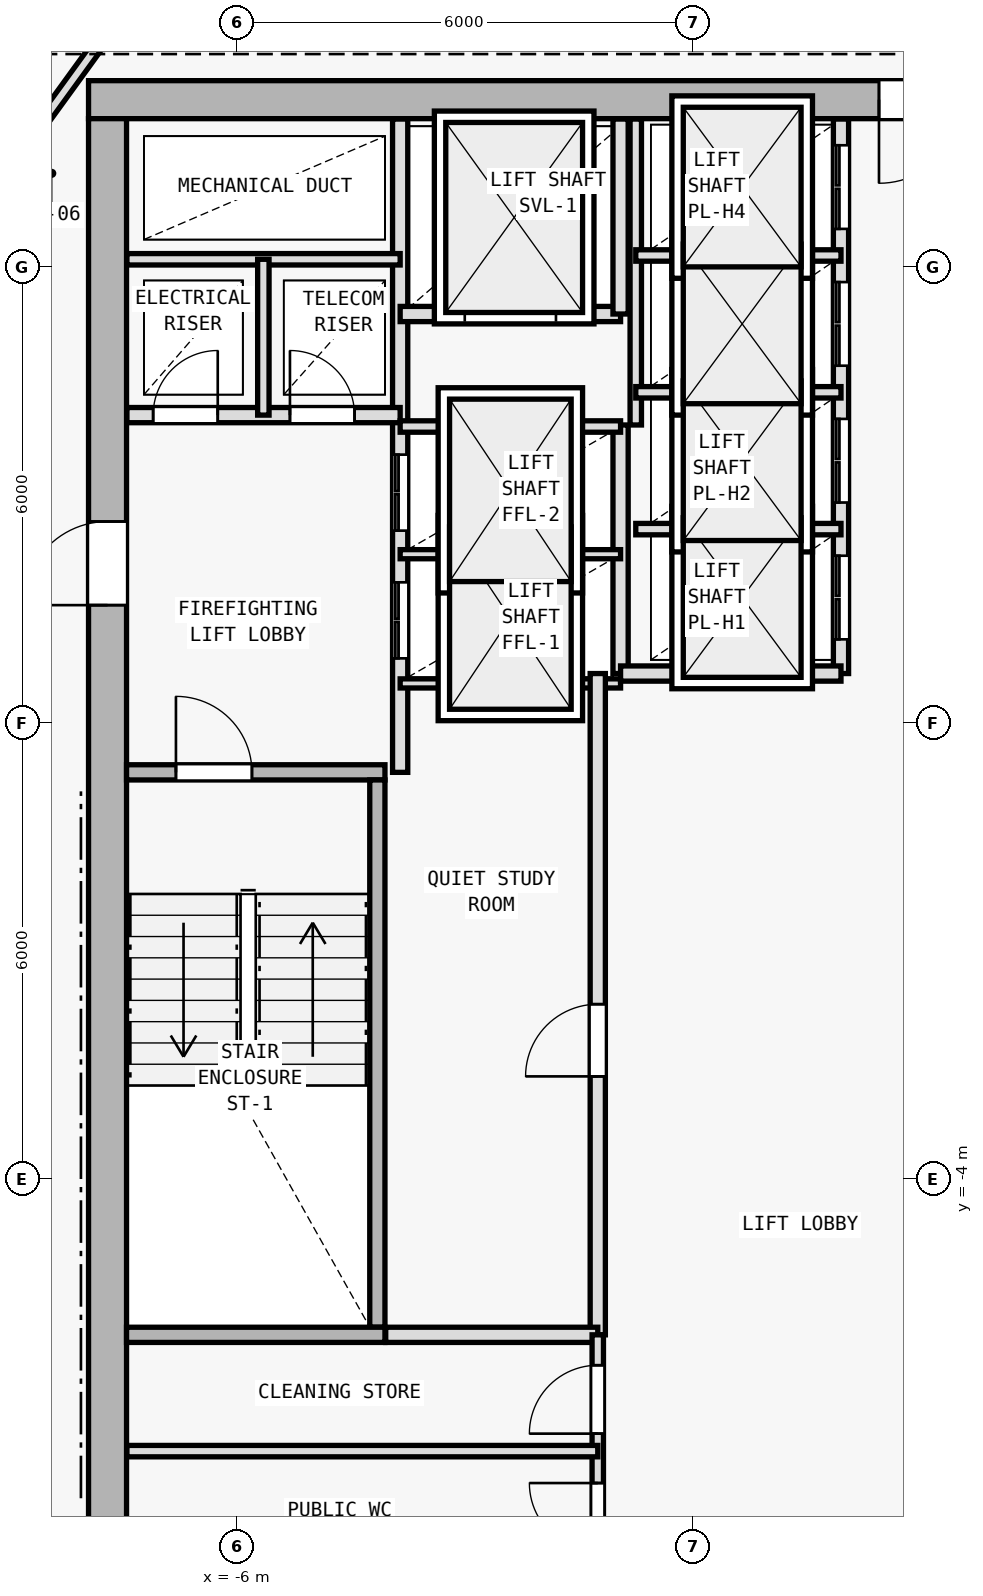
"""IFC4 building model, lengths in metres.
Left out: names, types, materials, properties, quantities, classifications, styles, units other than length and angle.
Written with IfcOpenShell. Run it as: python <this file> out.ifc"""

import sys

from ifc_helpers import new_model, si_unit, direction, frame, frame_2d, origin, origin_2d, place, context, subcontext, project, spatial, rectangle, i_section, extrude, element, fill, save


model = new_model("IFC4")
c1 = context("Model", 3, precision=1e-05, world=origin(), true_north=direction((0.0, 1.0)))
c2 = subcontext(c1, "Body", "Model", "MODEL_VIEW")
j1 = project(units=[si_unit("LENGTHUNIT", "METRE"), si_unit("PLANEANGLEUNIT", "RADIAN")], contexts=[c1])
p1 = place(None, origin())
s1 = spatial("IfcSite", under=j1, at=p1, CompositionType="ELEMENT")
p2 = place(p1, origin())
s2 = spatial("IfcBuilding", under=s1, at=p2, CompositionType="ELEMENT")
p3 = place(p2, frame((0.0, 0.0, 254.4)))
s3 = spatial("IfcBuildingStorey", under=s2, at=p3, CompositionType="ELEMENT", Elevation=254.4)
for number, where, z_axis, x_axis in (
    (1, (-7.7, 10.2, 0.0), (0.0, 0.0, 1.0), (1.0, 0.0, 0.0)),
    (2, (-7.7, 2.0, 0.0), (0.0, 0.0, 1.0), (1.0, 0.0, 0.0)),
):
    element("IfcColumn", number, at=place(p3, frame(where, z_axis=z_axis, x_axis=x_axis)), inside=s3, PredefinedType="COLUMN", context=c2, shape_type="SweptSolid", body=[
        extrude(i_section(OverallWidth=0.374, OverallDepth=0.372, WebThickness=0.012, FlangeThickness=0.02, FilletRadius=0.015, at=origin_2d()), origin(), (0.0, 0.0, 1.0), 3.6),
    ])
p4 = place(p3, frame((7.95, 10.2, 0.0), z_axis=(0.0, 0.0, 1.0), x_axis=(-1.0, 0.0, 0.0)))
e3 = element("IfcWall", 3, at=p4, inside=s3, PredefinedType="SHEAR", context=c2, shape_type="SweptSolid", body=[
    extrude(rectangle(XDim=15.9, YDim=0.5, at=frame_2d((7.95, 0.0))), origin(), (0.0, 0.0, 1.0), 3.35),
])
p5 = place(p4, frame((4.4, 0.0, 0.0)))
e4 = element("IfcOpeningElement", 4, at=p5, cuts=e3, PredefinedType="OPENING", context=c2, shape_type="SweptSolid", body=[
    extrude(rectangle(XDim=1.1, YDim=2.15, at=frame_2d((0.55, 1.075))), frame((0.0, 0.26, 0.0), z_axis=(0.0, -1.0, 0.0), x_axis=(1.0, 0.0, 0.0)), (0.0, 0.0, 1.0), 0.52),
])
p6 = place(p3, frame((-7.7, -9.15, 0.0), z_axis=(0.0, 0.0, 1.0), x_axis=(0.0, 1.0, 0.0)))
e5 = element("IfcWall", 5, at=p6, inside=s3, PredefinedType="SHEAR", context=c2, shape_type="SweptSolid", body=[
    extrude(rectangle(XDim=19.1, YDim=0.5, at=frame_2d((9.55, 0.0))), origin(), (0.0, 0.0, 1.0), 3.35),
])
p7 = place(p6, frame((12.7, 0.0, 0.0)))
e6 = element("IfcOpeningElement", 6, at=p7, cuts=e5, PredefinedType="OPENING", context=c2, shape_type="SweptSolid", body=[
    extrude(rectangle(XDim=1.1, YDim=2.15, at=frame_2d((0.55, 1.075))), frame((0.0, 0.26, 0.0), z_axis=(0.0, -1.0, 0.0), x_axis=(1.0, 0.0, 0.0)), (0.0, 0.0, 1.0), 0.52),
])
p8 = place(p3, frame((-7.45, 1.35, 0.0), z_axis=(0.0, 0.0, 1.0), x_axis=(1.0, 0.0, 0.0)))
e7 = element("IfcWall", 7, at=p8, inside=s3, PredefinedType="SOLIDWALL", context=c2, shape_type="SweptSolid", body=[
    extrude(rectangle(XDim=3.4, YDim=0.2, at=frame_2d((1.7, 0.0))), origin(), (0.0, 0.0, 1.0), 3.35),
])
p9 = place(p8, frame((0.65, 0.0, 0.0)))
e8 = element("IfcOpeningElement", 8, at=p9, cuts=e7, PredefinedType="OPENING", context=c2, shape_type="SweptSolid", body=[
    extrude(rectangle(XDim=1.0, YDim=2.15, at=frame_2d((0.5, 1.075))), frame((0.0, 0.11, 0.0), z_axis=(0.0, -1.0, 0.0), x_axis=(1.0, 0.0, 0.0)), (0.0, 0.0, 1.0), 0.22),
])
p10 = place(p3, frame((-4.15, -5.95, 0.0), z_axis=(0.0, 0.0, 1.0), x_axis=(0.0, 1.0, 0.0)))
e9 = element("IfcWall", 9, at=p10, inside=s3, PredefinedType="SOLIDWALL", context=c2, shape_type="SweptSolid", body=[
    extrude(rectangle(XDim=7.2, YDim=0.2, at=frame_2d((3.6, 0.0))), origin(), (0.0, 0.0, 1.0), 3.35),
])
p11 = place(p3, frame((-3.85, 1.35, 0.0), z_axis=(0.0, 0.0, 1.0), x_axis=(0.0, 1.0, 0.0)))
e10 = element("IfcWall", 10, at=p11, inside=s3, PredefinedType="SOLIDWALL", context=c2, shape_type="SweptSolid", body=[
    extrude(rectangle(XDim=8.595, YDim=0.2, at=frame_2d((4.297, 0.0))), origin(), (0.0, 0.0, 1.0), 3.35),
])
p12 = place(p11, frame((1.5, 0.0, 0.0)))
e11 = element("IfcOpeningElement", 11, at=p12, cuts=e10, PredefinedType="OPENING", context=c2, shape_type="SweptSolid", body=[
    extrude(rectangle(XDim=1.0, YDim=2.15, at=frame_2d((0.5, 1.075))), frame((0.0, 0.11, 0.0), z_axis=(0.0, -1.0, 0.0), x_axis=(1.0, 0.0, 0.0)), (0.0, 0.0, 1.0), 0.22),
])
p13 = place(p11, frame((3.18, 0.0, 0.0)))
e12 = element("IfcOpeningElement", 12, at=p13, cuts=e10, PredefinedType="OPENING", context=c2, shape_type="SweptSolid", body=[
    extrude(rectangle(XDim=1.0, YDim=2.15, at=frame_2d((0.5, 1.075))), frame((0.0, 0.11, 0.0), z_axis=(0.0, -1.0, 0.0), x_axis=(1.0, 0.0, 0.0)), (0.0, 0.0, 1.0), 0.22),
])
p14 = place(p3, frame((-7.445, 6.05, 0.0), z_axis=(0.0, 0.0, 1.0), x_axis=(1.0, 0.0, 0.0)))
e13 = element("IfcWall", 13, at=p14, inside=s3, PredefinedType="SOLIDWALL", context=c2, shape_type="SweptSolid", body=[
    extrude(rectangle(XDim=3.595, YDim=0.2, at=frame_2d((1.797, 0.0))), origin(), (0.0, 0.0, 1.0), 3.35),
])
p15 = place(p14, frame((0.345, 0.0, 0.0)))
e14 = element("IfcOpeningElement", 14, at=p15, cuts=e13, PredefinedType="OPENING", context=c2, shape_type="SweptSolid", body=[
    extrude(rectangle(XDim=0.85, YDim=2.1, at=frame_2d((0.425, 1.05))), frame((0.0, 0.11, 0.0), z_axis=(0.0, -1.0, 0.0), x_axis=(1.0, 0.0, 0.0)), (0.0, 0.0, 1.0), 0.22),
])
p16 = place(p14, frame((2.145, 0.0, 0.0)))
e15 = element("IfcOpeningElement", 15, at=p16, cuts=e13, PredefinedType="OPENING", context=c2, shape_type="SweptSolid", body=[
    extrude(rectangle(XDim=0.85, YDim=2.1, at=frame_2d((0.425, 1.05))), frame((0.0, 0.11, 0.0), z_axis=(0.0, -1.0, 0.0), x_axis=(1.0, 0.0, 0.0)), (0.0, 0.0, 1.0), 0.22),
])
p17 = place(p3, frame((-7.445, 8.1, 0.0), z_axis=(0.0, 0.0, 1.0), x_axis=(1.0, 0.0, 0.0)))
e16 = element("IfcWall", 16, at=p17, inside=s3, PredefinedType="PARTITIONING", context=c2, shape_type="SweptSolid", body=[
    extrude(rectangle(XDim=3.595, YDim=0.15, at=frame_2d((1.797, 0.0))), origin(), (0.0, 0.0, 1.0), 3.35),
])
p18 = place(p3, frame((-5.65, 6.05, 0.0), z_axis=(0.0, 0.0, 1.0), x_axis=(0.0, 1.0, 0.0)))
e17 = element("IfcWall", 17, at=p18, inside=s3, PredefinedType="PARTITIONING", context=c2, shape_type="SweptSolid", body=[
    extrude(rectangle(XDim=2.05, YDim=0.15, at=frame_2d((1.025, 0.0))), origin(), (0.0, 0.0, 1.0), 3.35),
])
p19 = place(p3, frame((-0.95, 2.65, 0.0), z_axis=(0.0, 0.0, 1.0), x_axis=(0.0, 1.0, 0.0)))
e18 = element("IfcWall", 18, at=p19, inside=s3, PredefinedType="SOLIDWALL", context=c2, shape_type="SweptSolid", body=[
    extrude(rectangle(XDim=3.27, YDim=0.2, at=frame_2d((1.635, 0.0))), origin(), (0.0, 0.0, 1.0), 3.35),
])
for number, where, z_axis, x_axis in (
    (19, (-3.85, 2.52, 0.0), (0.0, 0.0, 1.0), (1.0, 0.0, 0.0)),
    (20, (-3.85, 4.22, 0.0), (0.0, 0.0, 1.0), (1.0, 0.0, 0.0)),
):
    element("IfcWall", number, at=place(p3, frame(where, z_axis=z_axis, x_axis=x_axis)), inside=s3, PredefinedType="PARTITIONING", context=c2, shape_type="SweptSolid", body=[
        extrude(rectangle(XDim=2.9, YDim=0.12, at=frame_2d((1.45, 0.0))), origin(), (0.0, 0.0, 1.0), 3.35),
    ])
p20 = place(p3, frame((-3.85, 5.9, 0.0), z_axis=(0.0, 0.0, 1.0), x_axis=(1.0, 0.0, 0.0)))
e21 = element("IfcWall", 21, at=p20, inside=s3, PredefinedType="PARTITIONING", context=c2, shape_type="SweptSolid", body=[
    extrude(rectangle(XDim=2.9, YDim=0.15, at=frame_2d((1.45, 0.0))), origin(), (0.0, 0.0, 1.0), 3.35),
])
p21 = place(p3, frame((-3.85, 7.38, 0.0), z_axis=(0.0, 0.0, 1.0), x_axis=(1.0, 0.0, 0.0)))
e22 = element("IfcWall", 22, at=p21, inside=s3, PredefinedType="SOLIDWALL", context=c2, shape_type="SweptSolid", body=[
    extrude(rectangle(XDim=2.9, YDim=0.2, at=frame_2d((1.45, 0.0))), origin(), (0.0, 0.0, 1.0), 3.35),
])
p22 = place(p21, frame((0.85, 0.0, 0.0)))
e23 = element("IfcOpeningElement", 23, at=p22, cuts=e22, PredefinedType="OPENING", context=c2, shape_type="SweptSolid", body=[
    extrude(rectangle(XDim=1.2, YDim=2.2, at=frame_2d((0.6, 1.1))), frame((0.0, 0.11, 0.0), z_axis=(0.0, -1.0, 0.0), x_axis=(1.0, 0.0, 0.0)), (0.0, 0.0, 1.0), 0.22),
])
p23 = place(p3, frame((-0.95, 7.38, 0.0), z_axis=(0.0, 0.0, 1.0), x_axis=(0.0, 1.0, 0.0)))
e24 = element("IfcWall", 24, at=p23, inside=s3, PredefinedType="SOLIDWALL", context=c2, shape_type="SweptSolid", body=[
    extrude(rectangle(XDim=2.565, YDim=0.2, at=frame_2d((1.283, 0.0))), origin(), (0.0, 0.0, 1.0), 3.35),
])
p24 = place(p3, frame((-1.25, -6.05, 0.0), z_axis=(0.0, 0.0, 1.0), x_axis=(0.0, 1.0, 0.0)))
e25 = element("IfcWall", 25, at=p24, inside=s3, PredefinedType="SOLIDWALL", context=c2, shape_type="SweptSolid", body=[
    extrude(rectangle(XDim=8.7, YDim=0.2, at=frame_2d((4.35, 0.0))), origin(), (0.0, 0.0, 1.0), 3.35),
])
p25 = place(p24, frame((3.4, 0.0, 0.0)))
e26 = element("IfcOpeningElement", 26, at=p25, cuts=e25, PredefinedType="OPENING", context=c2, shape_type="SweptSolid", body=[
    extrude(rectangle(XDim=0.95, YDim=2.1, at=frame_2d((0.475, 1.05))), frame((0.0, 0.11, 0.0), z_axis=(0.0, -1.0, 0.0), x_axis=(1.0, 0.0, 0.0)), (0.0, 0.0, 1.0), 0.22),
])
p26 = place(p3, frame((1.95, 2.65, 0.0), z_axis=(0.0, 0.0, 1.0), x_axis=(0.0, 1.0, 0.0)))
e27 = element("IfcWall", 27, at=p26, inside=s3, PredefinedType="SOLIDWALL", context=c2, shape_type="SweptSolid", body=[
    extrude(rectangle(XDim=7.295, YDim=0.2, at=frame_2d((3.647, 0.0))), origin(), (0.0, 0.0, 1.0), 3.35),
])
p27 = place(p26, frame((0.45, 0.0, 0.0)))
e28 = element("IfcOpeningElement", 28, at=p27, cuts=e27, PredefinedType="OPENING", context=c2, shape_type="SweptSolid", body=[
    extrude(rectangle(XDim=1.1, YDim=2.15, at=frame_2d((0.55, 1.075))), frame((0.0, 0.11, 0.0), z_axis=(0.0, -1.0, 0.0), x_axis=(1.0, 0.0, 0.0)), (0.0, 0.0, 1.0), 0.22),
])
p28 = place(p26, frame((2.25, 0.0, 0.0)))
e29 = element("IfcOpeningElement", 29, at=p28, cuts=e27, PredefinedType="OPENING", context=c2, shape_type="SweptSolid", body=[
    extrude(rectangle(XDim=1.1, YDim=2.15, at=frame_2d((0.55, 1.075))), frame((0.0, 0.11, 0.0), z_axis=(0.0, -1.0, 0.0), x_axis=(1.0, 0.0, 0.0)), (0.0, 0.0, 1.0), 0.22),
])
p29 = place(p26, frame((4.05, 0.0, 0.0)))
e30 = element("IfcOpeningElement", 30, at=p29, cuts=e27, PredefinedType="OPENING", context=c2, shape_type="SweptSolid", body=[
    extrude(rectangle(XDim=1.1, YDim=2.15, at=frame_2d((0.55, 1.075))), frame((0.0, 0.11, 0.0), z_axis=(0.0, -1.0, 0.0), x_axis=(1.0, 0.0, 0.0)), (0.0, 0.0, 1.0), 0.22),
])
p30 = place(p26, frame((5.85, 0.0, 0.0)))
e31 = element("IfcOpeningElement", 31, at=p30, cuts=e27, PredefinedType="OPENING", context=c2, shape_type="SweptSolid", body=[
    extrude(rectangle(XDim=1.1, YDim=2.15, at=frame_2d((0.55, 1.075))), frame((0.0, 0.11, 0.0), z_axis=(0.0, -1.0, 0.0), x_axis=(1.0, 0.0, 0.0)), (0.0, 0.0, 1.0), 0.22),
])
p31 = place(p3, frame((-0.95, 2.65, 0.0), z_axis=(0.0, 0.0, 1.0), x_axis=(1.0, 0.0, 0.0)))
e32 = element("IfcWall", 32, at=p31, inside=s3, PredefinedType="SOLIDWALL", context=c2, shape_type="SweptSolid", body=[
    extrude(rectangle(XDim=2.9, YDim=0.2, at=frame_2d((1.45, 0.0))), origin(), (0.0, 0.0, 1.0), 3.35),
])
p32 = place(p3, frame((-0.75, 5.92, 0.0), z_axis=(0.0, 0.0, 1.0), x_axis=(0.0, 1.0, 0.0)))
e33 = element("IfcWall", 33, at=p32, inside=s3, PredefinedType="PARTITIONING", context=c2, shape_type="SweptSolid", body=[
    extrude(rectangle(XDim=4.025, YDim=0.15, at=frame_2d((2.013, 0.0))), origin(), (0.0, 0.0, 1.0), 3.35),
])
for number, where, z_axis, x_axis in (
    (34, (-0.75, 4.55, 0.0), (0.0, 0.0, 1.0), (1.0, 0.0, 0.0)),
    (35, (-0.75, 6.35, 0.0), (0.0, 0.0, 1.0), (1.0, 0.0, 0.0)),
    (36, (-0.75, 8.15, 0.0), (0.0, 0.0, 1.0), (1.0, 0.0, 0.0)),
):
    element("IfcWall", number, at=place(p3, frame(where, z_axis=z_axis, x_axis=x_axis)), inside=s3, PredefinedType="PARTITIONING", context=c2, shape_type="SweptSolid", body=[
        extrude(rectangle(XDim=2.7, YDim=0.15, at=frame_2d((1.35, 0.0))), origin(), (0.0, 0.0, 1.0), 3.35),
    ])
p33 = place(p3, frame((-7.45, -6.05, 0.0), z_axis=(0.0, 0.0, 1.0), x_axis=(1.0, 0.0, 0.0)))
e37 = element("IfcWall", 37, at=p33, inside=s3, PredefinedType="SOLIDWALL", context=c2, shape_type="SweptSolid", body=[
    extrude(rectangle(XDim=3.4, YDim=0.2, at=frame_2d((1.7, 0.0))), origin(), (0.0, 0.0, 1.0), 3.35),
])
p34 = place(p3, frame((-4.04, -6.05, 0.0), z_axis=(0.0, 0.0, 1.0), x_axis=(1.0, 0.0, 0.0)))
e38 = element("IfcWall", 38, at=p34, inside=s3, PredefinedType="SOLIDWALL", context=c2, shape_type="SweptSolid", body=[
    extrude(rectangle(XDim=2.79, YDim=0.2, at=frame_2d((1.395, 0.0))), origin(), (0.0, 0.0, 1.0), 3.35),
])
p35 = place(p3, frame((-1.25, -9.145, 0.0), z_axis=(0.0, 0.0, 1.0), x_axis=(0.0, 1.0, 0.0)))
e39 = element("IfcWall", 39, at=p35, inside=s3, PredefinedType="PARTITIONING", context=c2, shape_type="SweptSolid", body=[
    extrude(rectangle(XDim=3.095, YDim=0.15, at=frame_2d((1.547, 0.0))), origin(), (0.0, 0.0, 1.0), 3.35),
])
p36 = place(p35, frame((1.795, 0.0, 0.0)))
e40 = element("IfcOpeningElement", 40, at=p36, cuts=e39, PredefinedType="OPENING", context=c2, shape_type="SweptSolid", body=[
    extrude(rectangle(XDim=0.9, YDim=2.1, at=frame_2d((0.45, 1.05))), frame((0.0, 0.085, 0.0), z_axis=(0.0, -1.0, 0.0), x_axis=(1.0, 0.0, 0.0)), (0.0, 0.0, 1.0), 0.17),
])
p37 = place(p35, frame((0.245, 0.0, 0.0)))
e41 = element("IfcOpeningElement", 41, at=p37, cuts=e39, PredefinedType="OPENING", context=c2, shape_type="SweptSolid", body=[
    extrude(rectangle(XDim=0.9, YDim=2.1, at=frame_2d((0.45, 1.05))), frame((0.0, 0.085, 0.0), z_axis=(0.0, -1.0, 0.0), x_axis=(1.0, 0.0, 0.0)), (0.0, 0.0, 1.0), 0.17),
])
p38 = place(p3, frame((-7.445, -7.58, 0.0), z_axis=(0.0, 0.0, 1.0), x_axis=(1.0, 0.0, 0.0)))
e42 = element("IfcWall", 42, at=p38, inside=s3, PredefinedType="PARTITIONING", context=c2, shape_type="SweptSolid", body=[
    extrude(rectangle(XDim=6.195, YDim=0.15, at=frame_2d((3.098, 0.0))), origin(), (0.0, 0.0, 1.0), 3.35),
])
p39 = place(p3, frame((-9.78, 8.226, 0.0), z_axis=(0.0, 0.0, 1.0), x_axis=(0.586956386413, 0.809618552436, 0.0)))
e43 = element("IfcWall", 43, at=p39, inside=s3, PredefinedType="PARTITIONING", context=c2, shape_type="SweptSolid", body=[
    extrude(rectangle(XDim=5.008, YDim=0.15, at=frame_2d((2.504, 0.0))), origin(), (0.0, 0.0, 1.0), 2.925),
])
p40 = place(p39, frame((1.154, 0.0, 0.0)))
e44 = element("IfcOpeningElement", 44, at=p40, cuts=e43, PredefinedType="OPENING", context=c2, shape_type="SweptSolid", body=[
    extrude(rectangle(XDim=0.9, YDim=2.1, at=frame_2d((0.45, 1.05))), frame((0.0, 0.085, 0.0), z_axis=(0.0, -1.0, 0.0), x_axis=(1.0, 0.0, 0.0)), (0.0, 0.0, 1.0), 0.17),
])
p41 = place(p7, origin())
e45 = element("IfcDoor", 45, at=p41, inside=s3, OperationType="SINGLE_SWING_LEFT", PredefinedType="DOOR", context=c2, shape_type="SweptSolid", body=[
    extrude(rectangle(XDim=1.1, YDim=2.15, at=frame_2d((0.55, 1.075))), frame((0.0, 0.025, 0.0), z_axis=(0.0, -1.0, 0.0), x_axis=(1.0, 0.0, 0.0)), (0.0, 0.0, 1.0), 0.05),
])
fill(e6, e45)
p42 = place(p5, origin())
e46 = element("IfcDoor", 46, at=p42, inside=s3, OperationType="SINGLE_SWING_RIGHT", PredefinedType="DOOR", context=c2, shape_type="SweptSolid", body=[
    extrude(rectangle(XDim=1.1, YDim=2.15, at=frame_2d((0.55, 1.075))), frame((0.0, 0.025, 0.0), z_axis=(0.0, -1.0, 0.0), x_axis=(1.0, 0.0, 0.0)), (0.0, 0.0, 1.0), 0.05),
])
fill(e4, e46)
p43 = place(p9, origin())
e47 = element("IfcDoor", 47, at=p43, inside=s3, OperationType="SINGLE_SWING_LEFT", PredefinedType="DOOR", context=c2, shape_type="SweptSolid", body=[
    extrude(rectangle(XDim=1.0, YDim=2.15, at=frame_2d((0.5, 1.075))), frame((0.0, 0.025, 0.0), z_axis=(0.0, -1.0, 0.0), x_axis=(1.0, 0.0, 0.0)), (0.0, 0.0, 1.0), 0.05),
])
fill(e8, e47)
p44 = place(p15, origin())
e48 = element("IfcDoor", 48, at=p44, inside=s3, OperationType="SINGLE_SWING_RIGHT", PredefinedType="DOOR", context=c2, shape_type="SweptSolid", body=[
    extrude(rectangle(XDim=0.85, YDim=2.1, at=frame_2d((0.425, 1.05))), frame((0.0, 0.025, 0.0), z_axis=(0.0, -1.0, 0.0), x_axis=(1.0, 0.0, 0.0)), (0.0, 0.0, 1.0), 0.05),
])
fill(e14, e48)
p45 = place(p16, origin())
e49 = element("IfcDoor", 49, at=p45, inside=s3, OperationType="SINGLE_SWING_LEFT", PredefinedType="DOOR", context=c2, shape_type="SweptSolid", body=[
    extrude(rectangle(XDim=0.85, YDim=2.1, at=frame_2d((0.425, 1.05))), frame((0.0, 0.025, 0.0), z_axis=(0.0, -1.0, 0.0), x_axis=(1.0, 0.0, 0.0)), (0.0, 0.0, 1.0), 0.05),
])
fill(e15, e49)
p46 = place(p22, origin())
e50 = element("IfcDoor", 50, at=p46, inside=s3, OperationType="DOUBLE_DOOR_SLIDING", PredefinedType="DOOR", context=c2, shape_type="SweptSolid", body=[
    extrude(rectangle(XDim=1.2, YDim=2.2, at=frame_2d((0.6, 1.1))), frame((0.0, 0.025, 0.0), z_axis=(0.0, -1.0, 0.0), x_axis=(1.0, 0.0, 0.0)), (0.0, 0.0, 1.0), 0.05),
])
fill(e23, e50)
p47 = place(p25, origin())
e51 = element("IfcDoor", 51, at=p47, inside=s3, OperationType="SINGLE_SWING_LEFT", PredefinedType="DOOR", context=c2, shape_type="SweptSolid", body=[
    extrude(rectangle(XDim=0.95, YDim=2.1, at=frame_2d((0.475, 1.05))), frame((0.0, 0.025, 0.0), z_axis=(0.0, -1.0, 0.0), x_axis=(1.0, 0.0, 0.0)), (0.0, 0.0, 1.0), 0.05),
])
fill(e26, e51)
p48 = place(p27, origin())
e52 = element("IfcDoor", 52, at=p48, inside=s3, OperationType="DOUBLE_DOOR_SLIDING", PredefinedType="DOOR", context=c2, shape_type="SweptSolid", body=[
    extrude(rectangle(XDim=1.1, YDim=2.15, at=frame_2d((0.55, 1.075))), frame((0.0, 0.025, 0.0), z_axis=(0.0, -1.0, 0.0), x_axis=(1.0, 0.0, 0.0)), (0.0, 0.0, 1.0), 0.05),
])
fill(e28, e52)
p49 = place(p28, origin())
e53 = element("IfcDoor", 53, at=p49, inside=s3, OperationType="DOUBLE_DOOR_SLIDING", PredefinedType="DOOR", context=c2, shape_type="SweptSolid", body=[
    extrude(rectangle(XDim=1.1, YDim=2.15, at=frame_2d((0.55, 1.075))), frame((0.0, 0.025, 0.0), z_axis=(0.0, -1.0, 0.0), x_axis=(1.0, 0.0, 0.0)), (0.0, 0.0, 1.0), 0.05),
])
fill(e29, e53)
p50 = place(p29, origin())
e54 = element("IfcDoor", 54, at=p50, inside=s3, OperationType="DOUBLE_DOOR_SLIDING", PredefinedType="DOOR", context=c2, shape_type="SweptSolid", body=[
    extrude(rectangle(XDim=1.1, YDim=2.15, at=frame_2d((0.55, 1.075))), frame((0.0, 0.025, 0.0), z_axis=(0.0, -1.0, 0.0), x_axis=(1.0, 0.0, 0.0)), (0.0, 0.0, 1.0), 0.05),
])
fill(e30, e54)
p51 = place(p30, origin())
e55 = element("IfcDoor", 55, at=p51, inside=s3, OperationType="DOUBLE_DOOR_SLIDING", PredefinedType="DOOR", context=c2, shape_type="SweptSolid", body=[
    extrude(rectangle(XDim=1.1, YDim=2.15, at=frame_2d((0.55, 1.075))), frame((0.0, 0.025, 0.0), z_axis=(0.0, -1.0, 0.0), x_axis=(1.0, 0.0, 0.0)), (0.0, 0.0, 1.0), 0.05),
])
fill(e31, e55)
p52 = place(p12, origin())
e56 = element("IfcDoor", 56, at=p52, inside=s3, OperationType="DOUBLE_DOOR_SLIDING", PredefinedType="DOOR", context=c2, shape_type="SweptSolid", body=[
    extrude(rectangle(XDim=1.0, YDim=2.15, at=frame_2d((0.5, 1.075))), frame((0.0, 0.025, 0.0), z_axis=(0.0, -1.0, 0.0), x_axis=(1.0, 0.0, 0.0)), (0.0, 0.0, 1.0), 0.05),
])
fill(e11, e56)
p53 = place(p13, origin())
e57 = element("IfcDoor", 57, at=p53, inside=s3, OperationType="DOUBLE_DOOR_SLIDING", PredefinedType="DOOR", context=c2, shape_type="SweptSolid", body=[
    extrude(rectangle(XDim=1.0, YDim=2.15, at=frame_2d((0.5, 1.075))), frame((0.0, 0.025, 0.0), z_axis=(0.0, -1.0, 0.0), x_axis=(1.0, 0.0, 0.0)), (0.0, 0.0, 1.0), 0.05),
])
fill(e12, e57)
p54 = place(p36, origin())
e58 = element("IfcDoor", 58, at=p54, inside=s3, OperationType="SINGLE_SWING_LEFT", PredefinedType="DOOR", context=c2, shape_type="SweptSolid", body=[
    extrude(rectangle(XDim=0.9, YDim=2.1, at=frame_2d((0.45, 1.05))), frame((0.0, 0.025, 0.0), z_axis=(0.0, -1.0, 0.0), x_axis=(1.0, 0.0, 0.0)), (0.0, 0.0, 1.0), 0.05),
])
fill(e40, e58)
p55 = place(p37, origin())
e59 = element("IfcDoor", 59, at=p55, inside=s3, OperationType="SINGLE_SWING_RIGHT", PredefinedType="DOOR", context=c2, shape_type="SweptSolid", body=[
    extrude(rectangle(XDim=0.9, YDim=2.1, at=frame_2d((0.45, 1.05))), frame((0.0, 0.025, 0.0), z_axis=(0.0, -1.0, 0.0), x_axis=(1.0, 0.0, 0.0)), (0.0, 0.0, 1.0), 0.05),
])
fill(e41, e59)
save(model, sys.argv[1])
